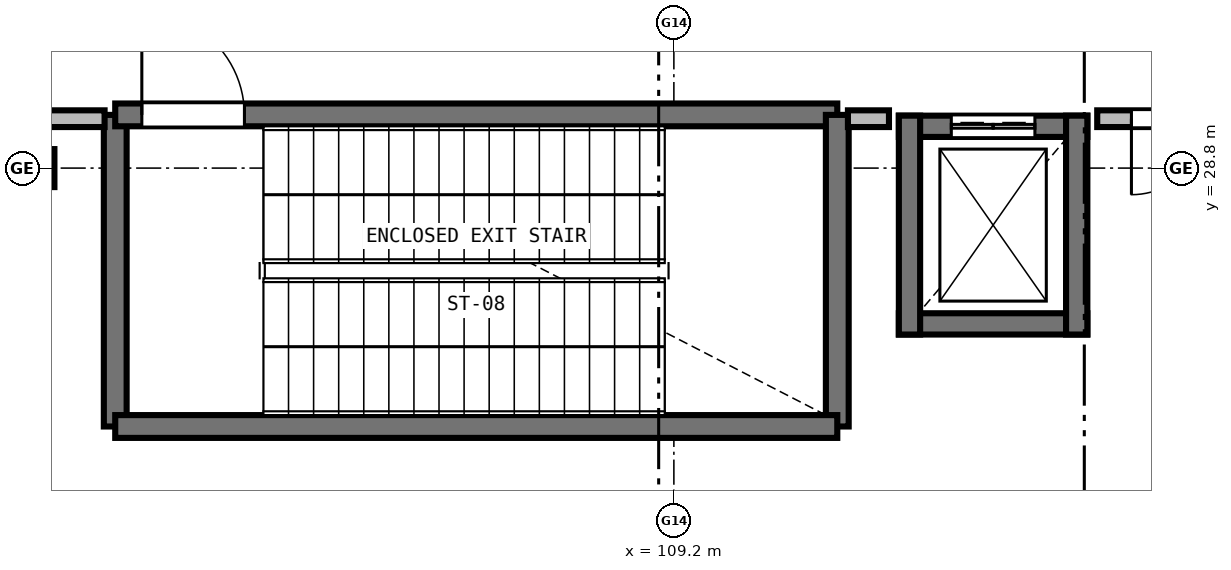
"""IFC4 building model, lengths in metres.
Left out: names, types, materials, properties, quantities, classifications, styles, units other than length and angle.
Written with IfcOpenShell. Run it as: python <this file> out.ifc"""

import sys

from ifc_helpers import new_model, si_unit, direction, frame, frame_2d, origin, origin_2d, place, context, subcontext, project, spatial, rectangle, extrude, element, fill, save


model = new_model("IFC4")
c1 = context("Model", 3, precision=1e-05, world=origin(), true_north=direction((0.0, 1.0)))
c2 = subcontext(c1, "Body", "Model", "MODEL_VIEW")
j1 = project(units=[si_unit("LENGTHUNIT", "METRE"), si_unit("PLANEANGLEUNIT", "RADIAN")], contexts=[c1])
p1 = place(None, origin())
s1 = spatial("IfcSite", under=j1, at=p1, CompositionType="ELEMENT")
p2 = place(p1, origin())
s2 = spatial("IfcBuilding", under=s1, at=p2, CompositionType="ELEMENT")
p3 = place(p2, origin())
s3 = spatial("IfcBuildingStorey", under=s2, at=p3, CompositionType="ELEMENT", Elevation=0.0)
p4 = place(p3, frame((100.8, 28.8, 0.0), z_axis=(0.0, 0.0, 1.0), x_axis=(1.0, 0.0, 0.0)))
e1 = element("IfcColumn", 1, at=p4, inside=s3, PredefinedType="COLUMN", context=c2, shape_type="SweptSolid", body=[
    extrude(rectangle(XDim=0.5, YDim=0.5, at=origin_2d()), origin(), (0.0, 0.0, 1.0), 5.1),
])
p5 = place(p3, frame((101.85, 25.4, 0.0), z_axis=(0.0, 0.0, 1.0), x_axis=(0.0, 1.0, 0.0)))
e2 = element("IfcWall", 2, at=p5, inside=s3, PredefinedType="SHEAR", context=c2, shape_type="SweptSolid", body=[
    extrude(rectangle(XDim=4.1, YDim=0.3, at=frame_2d((2.05, 0.0))), origin(), (0.0, 0.0, 1.0), 4.82),
])
p6 = place(p3, frame((101.85, 29.5, 0.0), z_axis=(0.0, 0.0, 1.0), x_axis=(1.0, 0.0, 0.0)))
e3 = element("IfcWall", 3, at=p6, inside=s3, PredefinedType="SHEAR", context=c2, shape_type="SweptSolid", body=[
    extrude(rectangle(XDim=9.5, YDim=0.3, at=frame_2d((4.75, 0.0))), origin(), (0.0, 0.0, 1.0), 4.82),
])
p7 = place(p6, frame((0.35, 0.0, 0.0)))
e4 = element("IfcOpeningElement", 4, at=p7, cuts=e3, PredefinedType="OPENING", context=c2, shape_type="SweptSolid", body=[
    extrude(rectangle(XDim=1.35, YDim=2.2, at=frame_2d((0.675, 1.1))), frame((0.0, 0.16, 0.0), z_axis=(0.0, -1.0, 0.0), x_axis=(1.0, 0.0, 0.0)), (0.0, 0.0, 1.0), 0.32),
])
p8 = place(p3, frame((111.35, 29.5, 0.0), z_axis=(0.0, 0.0, 1.0), x_axis=(0.0, -1.0, 0.0)))
e5 = element("IfcWall", 5, at=p8, inside=s3, PredefinedType="SHEAR", context=c2, shape_type="SweptSolid", body=[
    extrude(rectangle(XDim=4.1, YDim=0.3, at=frame_2d((2.05, 0.0))), origin(), (0.0, 0.0, 1.0), 4.82),
])
p9 = place(p3, frame((111.35, 25.4, 0.0), z_axis=(0.0, 0.0, 1.0), x_axis=(-1.0, 0.0, 0.0)))
e6 = element("IfcWall", 6, at=p9, inside=s3, PredefinedType="SHEAR", context=c2, shape_type="SweptSolid", body=[
    extrude(rectangle(XDim=9.5, YDim=0.3, at=frame_2d((4.75, 0.0))), origin(), (0.0, 0.0, 1.0), 4.82),
])
p10 = place(p3, frame((114.64, 26.75, 0.0), z_axis=(0.0, 0.0, 1.0), x_axis=(-1.0, 0.0, 0.0)))
e7 = element("IfcWall", 7, at=p10, inside=s3, PredefinedType="SHEAR", context=c2, shape_type="SweptSolid", body=[
    extrude(rectangle(XDim=2.48, YDim=0.28, at=frame_2d((1.24, 0.0))), origin(), (0.0, 0.0, 1.0), 4.82),
])
p11 = place(p3, frame((112.16, 29.35, 0.0), z_axis=(0.0, 0.0, 1.0), x_axis=(1.0, 0.0, 0.0)))
e8 = element("IfcWall", 8, at=p11, inside=s3, PredefinedType="SHEAR", context=c2, shape_type="SweptSolid", body=[
    extrude(rectangle(XDim=2.48, YDim=0.28, at=frame_2d((1.24, 0.0))), origin(), (0.0, 0.0, 1.0), 4.82),
])
p12 = place(p11, frame((0.69, 0.0, 0.0)))
e9 = element("IfcOpeningElement", 9, at=p12, cuts=e8, PredefinedType="OPENING", context=c2, shape_type="SweptSolid", body=[
    extrude(rectangle(XDim=1.1, YDim=2.15, at=frame_2d((0.55, 1.075))), frame((0.0, 0.15, 0.0), z_axis=(0.0, -1.0, 0.0), x_axis=(1.0, 0.0, 0.0)), (0.0, 0.0, 1.0), 0.3),
])
for number, where, z_axis, x_axis in (
    (10, (112.3, 26.61, 0.0), (0.0, 0.0, 1.0), (0.0, 1.0, 0.0)),
    (11, (114.5, 29.49, 0.0), (0.0, 0.0, 1.0), (0.0, -1.0, 0.0)),
):
    element("IfcWall", number, at=place(p3, frame(where, z_axis=z_axis, x_axis=x_axis)), inside=s3, PredefinedType="SHEAR", context=c2, shape_type="SweptSolid", body=[
        extrude(rectangle(XDim=2.88, YDim=0.28, at=frame_2d((1.44, 0.0))), origin(), (0.0, 0.0, 1.0), 4.82),
    ])
p13 = place(p3, frame((126.0, 29.45, 0.0), z_axis=(0.0, 0.0, 1.0), x_axis=(-1.0, 0.0, 0.0)))
e12 = element("IfcWall", 12, at=p13, inside=s3, PredefinedType="SOLIDWALL", context=c2, shape_type="SweptSolid", body=[
    extrude(rectangle(XDim=11.23, YDim=0.22, at=frame_2d((5.615, 0.0))), origin(), (0.0, 0.0, 1.0), 4.105),
])
p14 = place(p13, frame((9.78, 0.0, 0.0)))
e13 = element("IfcOpeningElement", 13, at=p14, cuts=e12, PredefinedType="OPENING", context=c2, shape_type="SweptSolid", body=[
    extrude(rectangle(XDim=1.0, YDim=2.1, at=frame_2d((0.5, 1.05))), frame((0.0, 0.12, 0.0), z_axis=(0.0, -1.0, 0.0), x_axis=(1.0, 0.0, 0.0)), (0.0, 0.0, 1.0), 0.24),
])
p15 = place(p3, frame((112.03, 29.45, 0.0), z_axis=(0.0, 0.0, 1.0), x_axis=(-1.0, 0.0, 0.0)))
e14 = element("IfcWall", 14, at=p15, inside=s3, PredefinedType="SOLIDWALL", context=c2, shape_type="SweptSolid", body=[
    extrude(rectangle(XDim=0.54, YDim=0.22, at=frame_2d((0.27, 0.0))), origin(), (0.0, 0.0, 1.0), 4.75),
])
p16 = place(p3, frame((101.71, 29.45, 0.0), z_axis=(0.0, 0.0, 1.0), x_axis=(-1.0, 0.0, 0.0)))
e15 = element("IfcWall", 15, at=p16, inside=s3, PredefinedType="SOLIDWALL", context=c2, shape_type="SweptSolid", body=[
    extrude(rectangle(XDim=0.91, YDim=0.22, at=frame_2d((0.455, 0.0))), origin(), (0.0, 0.0, 1.0), 4.105),
])
p17 = place(p7, origin())
e16 = element("IfcDoor", 16, at=p17, inside=s3, OperationType="SINGLE_SWING_LEFT", PredefinedType="DOOR", context=c2, shape_type="SweptSolid", body=[
    extrude(rectangle(XDim=1.35, YDim=2.2, at=frame_2d((0.675, 1.1))), frame((0.0, 0.025, 0.0), z_axis=(0.0, -1.0, 0.0), x_axis=(1.0, 0.0, 0.0)), (0.0, 0.0, 1.0), 0.05),
])
fill(e4, e16)
p18 = place(p12, origin())
e17 = element("IfcDoor", 17, at=p18, inside=s3, OperationType="DOUBLE_DOOR_SLIDING", PredefinedType="DOOR", context=c2, shape_type="SweptSolid", body=[
    extrude(rectangle(XDim=1.1, YDim=2.15, at=frame_2d((0.55, 1.075))), frame((0.0, 0.025, 0.0), z_axis=(0.0, -1.0, 0.0), x_axis=(1.0, 0.0, 0.0)), (0.0, 0.0, 1.0), 0.05),
])
fill(e9, e17)
p19 = place(p14, origin())
e18 = element("IfcDoor", 18, at=p19, inside=s3, OperationType="SINGLE_SWING_RIGHT", PredefinedType="DOOR", context=c2, shape_type="SweptSolid", body=[
    extrude(rectangle(XDim=1.0, YDim=2.1, at=frame_2d((0.5, 1.05))), frame((0.0, 0.025, 0.0), z_axis=(0.0, -1.0, 0.0), x_axis=(1.0, 0.0, 0.0)), (0.0, 0.0, 1.0), 0.05),
])
fill(e13, e18)
save(model, sys.argv[1])
